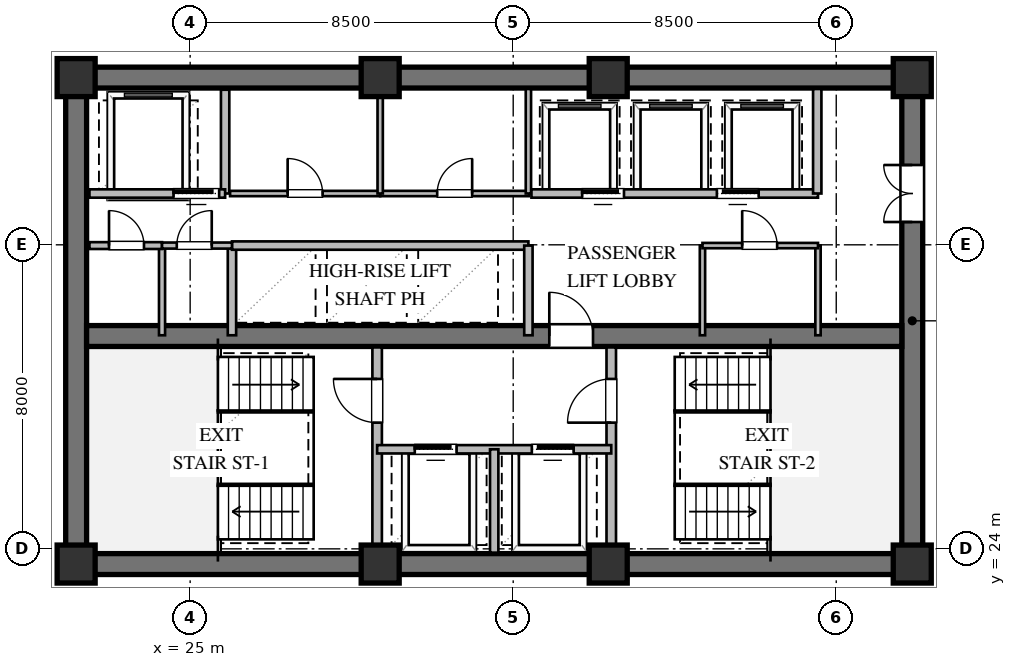
"""IFC4 building model, lengths in metres.
Left out: names, types, materials, properties, quantities, classifications, styles, units other than length and angle.
Written with IfcOpenShell. Run it as: python <this file> out.ifc"""

import sys

from ifc_helpers import new_model, si_unit, direction, frame, frame_2d, origin, origin_2d, place, context, subcontext, project, spatial, rectangle, extrude, element, fill, save


model = new_model("IFC4")
c1 = context("Model", 3, precision=1e-05, world=origin(), true_north=direction((0.0, 1.0)))
c2 = subcontext(c1, "Body", "Model", "MODEL_VIEW")
j1 = project(units=[si_unit("LENGTHUNIT", "METRE"), si_unit("PLANEANGLEUNIT", "RADIAN")], contexts=[c1])
p1 = place(None, origin())
s1 = spatial("IfcSite", under=j1, at=p1, CompositionType="ELEMENT")
p2 = place(p1, origin())
s2 = spatial("IfcBuilding", under=s1, at=p2, CompositionType="ELEMENT")
p3 = place(p2, frame((0.0, 0.0, 149.4)))
s3 = spatial("IfcBuildingStorey", under=s2, at=p3, CompositionType="ELEMENT", Elevation=149.4)
for number, where, z_axis, x_axis in (
    (1, (21.725, 23.6, 0.0), (0.0, 0.0, 1.0), (1.0, 0.0, 0.0)),
    (2, (21.725, 36.4, 0.0), (0.0, 0.0, 1.0), (1.0, 0.0, 0.0)),
):
    element("IfcWall", number, at=place(p3, frame(where, z_axis=z_axis, x_axis=x_axis)), inside=s3, PredefinedType="SHEAR", context=c2, shape_type="SweptSolid", body=[
        extrude(rectangle(XDim=22.55, YDim=0.55, at=frame_2d((11.275, 0.0))), origin(), (0.0, 0.0, 1.0), 3.36),
    ])
p4 = place(p3, frame((22.0, 23.875, 0.0), z_axis=(0.0, 0.0, 1.0), x_axis=(0.0, 1.0, 0.0)))
e3 = element("IfcWall", 3, at=p4, inside=s3, PredefinedType="SHEAR", context=c2, shape_type="SweptSolid", body=[
    extrude(rectangle(XDim=12.25, YDim=0.55, at=frame_2d((6.125, 0.0))), origin(), (0.0, 0.0, 1.0), 3.36),
])
p5 = place(p3, frame((44.0, 23.875, 0.0), z_axis=(0.0, 0.0, 1.0), x_axis=(0.0, 1.0, 0.0)))
e4 = element("IfcWall", 4, at=p5, inside=s3, PredefinedType="SHEAR", context=c2, shape_type="SweptSolid", body=[
    extrude(rectangle(XDim=12.25, YDim=0.55, at=frame_2d((6.125, 0.0))), origin(), (0.0, 0.0, 1.0), 3.36),
])
p6 = place(p5, frame((8.725, 0.0, 0.0)))
e5 = element("IfcOpeningElement", 5, at=p6, cuts=e4, PredefinedType="OPENING", context=c2, shape_type="SweptSolid", body=[
    extrude(rectangle(XDim=1.5, YDim=2.15, at=frame_2d((0.75, 1.075))), frame((0.0, 0.285, 0.0), z_axis=(0.0, -1.0, 0.0), x_axis=(1.0, 0.0, 0.0)), (0.0, 0.0, 1.0), 0.57),
])
p7 = place(p3, frame((22.275, 29.6, 0.0), z_axis=(0.0, 0.0, 1.0), x_axis=(1.0, 0.0, 0.0)))
e6 = element("IfcWall", 6, at=p7, inside=s3, PredefinedType="SHEAR", context=c2, shape_type="SweptSolid", body=[
    extrude(rectangle(XDim=21.45, YDim=0.55, at=frame_2d((10.725, 0.0))), origin(), (0.0, 0.0, 1.0), 3.36),
])
p8 = place(p7, frame((12.175, 0.0, 0.0)))
e7 = element("IfcOpeningElement", 7, at=p8, cuts=e6, PredefinedType="OPENING", context=c2, shape_type="SweptSolid", body=[
    extrude(rectangle(XDim=1.15, YDim=2.1, at=frame_2d((0.575, 1.05))), frame((0.0, 0.285, 0.0), z_axis=(0.0, -1.0, 0.0), x_axis=(1.0, 0.0, 0.0)), (0.0, 0.0, 1.0), 0.57),
])
for number, where, z_axis, x_axis in (
    (8, (22.0, 23.6, 0.0), (0.0, 0.0, 1.0), (1.0, 0.0, 0.0)),
    (9, (30.0, 23.6, 0.0), (0.0, 0.0, 1.0), (1.0, 0.0, 0.0)),
    (10, (36.0, 23.6, 0.0), (0.0, 0.0, 1.0), (1.0, 0.0, 0.0)),
    (11, (44.0, 23.6, 0.0), (0.0, 0.0, 1.0), (1.0, 0.0, 0.0)),
    (12, (44.0, 36.4, 0.0), (0.0, 0.0, 1.0), (1.0, 0.0, 0.0)),
    (13, (36.0, 36.4, 0.0), (0.0, 0.0, 1.0), (1.0, 0.0, 0.0)),
    (14, (30.0, 36.4, 0.0), (0.0, 0.0, 1.0), (1.0, 0.0, 0.0)),
    (15, (22.0, 36.4, 0.0), (0.0, 0.0, 1.0), (1.0, 0.0, 0.0)),
):
    element("IfcColumn", number, at=place(p3, frame(where, z_axis=z_axis, x_axis=x_axis)), inside=s3, PredefinedType="COLUMN", context=c2, shape_type="SweptSolid", body=[
        extrude(rectangle(XDim=1.0, YDim=1.0, at=origin_2d()), origin(), (0.0, 0.0, 1.0), 3.6),
    ])
p9 = place(p3, frame((29.92, 23.9, 0.0), z_axis=(0.0, 0.0, 1.0), x_axis=(0.0, 1.0, 0.0)))
e16 = element("IfcWall", 16, at=p9, inside=s3, PredefinedType="SOLIDWALL", context=c2, shape_type="SweptSolid", body=[
    extrude(rectangle(XDim=5.4, YDim=0.25, at=frame_2d((2.7, 0.0))), origin(), (0.0, 0.0, 1.0), 2.89),
])
p10 = place(p9, frame((3.421, 0.0, 0.0)))
e17 = element("IfcOpeningElement", 17, at=p10, cuts=e16, PredefinedType="OPENING", context=c2, shape_type="SweptSolid", body=[
    extrude(rectangle(XDim=1.15, YDim=2.1, at=frame_2d((0.575, 1.05))), frame((0.0, 0.135, 0.0), z_axis=(0.0, -1.0, 0.0), x_axis=(1.0, 0.0, 0.0)), (0.0, 0.0, 1.0), 0.27),
])
p11 = place(p3, frame((36.08, 23.9, 0.0), z_axis=(0.0, 0.0, 1.0), x_axis=(0.0, 1.0, 0.0)))
e18 = element("IfcWall", 18, at=p11, inside=s3, PredefinedType="SOLIDWALL", context=c2, shape_type="SweptSolid", body=[
    extrude(rectangle(XDim=5.4, YDim=0.25, at=frame_2d((2.7, 0.0))), origin(), (0.0, 0.0, 1.0), 3.36),
])
p12 = place(p11, frame((3.421, 0.0, 0.0)))
e19 = element("IfcOpeningElement", 19, at=p12, cuts=e18, PredefinedType="OPENING", context=c2, shape_type="SweptSolid", body=[
    extrude(rectangle(XDim=1.15, YDim=2.1, at=frame_2d((0.575, 1.05))), frame((0.0, 0.135, 0.0), z_axis=(0.0, -1.0, 0.0), x_axis=(1.0, 0.0, 0.0)), (0.0, 0.0, 1.0), 0.27),
])
p13 = place(p3, frame((29.92, 26.62, 0.0), z_axis=(0.0, 0.0, 1.0), x_axis=(1.0, 0.0, 0.0)))
e20 = element("IfcWall", 20, at=p13, inside=s3, PredefinedType="SOLIDWALL", context=c2, shape_type="SweptSolid", body=[
    extrude(rectangle(XDim=6.16, YDim=0.22, at=frame_2d((3.08, 0.0))), origin(), (0.0, 0.0, 1.0), 3.36),
])
p14 = place(p13, frame((0.99, 0.0, 0.0)))
e21 = element("IfcOpeningElement", 21, at=p14, cuts=e20, PredefinedType="OPENING", context=c2, shape_type="SweptSolid", body=[
    extrude(rectangle(XDim=1.1, YDim=2.1, at=frame_2d((0.55, 1.05))), frame((0.0, 0.12, 0.0), z_axis=(0.0, -1.0, 0.0), x_axis=(1.0, 0.0, 0.0)), (0.0, 0.0, 1.0), 0.24),
])
p15 = place(p13, frame((4.07, 0.0, 0.0)))
e22 = element("IfcOpeningElement", 22, at=p15, cuts=e20, PredefinedType="OPENING", context=c2, shape_type="SweptSolid", body=[
    extrude(rectangle(XDim=1.1, YDim=2.1, at=frame_2d((0.55, 1.05))), frame((0.0, 0.12, 0.0), z_axis=(0.0, -1.0, 0.0), x_axis=(1.0, 0.0, 0.0)), (0.0, 0.0, 1.0), 0.24),
])
p16 = place(p3, frame((33.0, 23.9, 0.0), z_axis=(0.0, 0.0, 1.0), x_axis=(0.0, 1.0, 0.0)))
e23 = element("IfcWall", 23, at=p16, inside=s3, PredefinedType="SOLIDWALL", context=c2, shape_type="SweptSolid", body=[
    extrude(rectangle(XDim=2.72, YDim=0.22, at=frame_2d((1.36, 0.0))), origin(), (0.0, 0.0, 1.0), 3.36),
])
p17 = place(p3, frame((25.92, 33.35, 0.0), z_axis=(0.0, 0.0, 1.0), x_axis=(0.0, 1.0, 0.0)))
e24 = element("IfcWall", 24, at=p17, inside=s3, PredefinedType="SOLIDWALL", context=c2, shape_type="SweptSolid", body=[
    extrude(rectangle(XDim=2.73, YDim=0.22, at=frame_2d((1.365, 0.0))), origin(), (0.0, 0.0, 1.0), 3.36),
])
p18 = place(p3, frame((22.35, 33.35, 0.0), z_axis=(0.0, 0.0, 1.0), x_axis=(1.0, 0.0, 0.0)))
e25 = element("IfcWall", 25, at=p18, inside=s3, PredefinedType="SOLIDWALL", context=c2, shape_type="SweptSolid", body=[
    extrude(rectangle(XDim=3.57, YDim=0.22, at=frame_2d((1.785, 0.0))), origin(), (0.0, 0.0, 1.0), 3.36),
])
p19 = place(p18, frame((2.213, 0.0, 0.0)))
e26 = element("IfcOpeningElement", 26, at=p19, cuts=e25, PredefinedType="OPENING", context=c2, shape_type="SweptSolid", body=[
    extrude(rectangle(XDim=1.2, YDim=2.1, at=frame_2d((0.6, 1.05))), frame((0.0, 0.12, 0.0), z_axis=(0.0, -1.0, 0.0), x_axis=(1.0, 0.0, 0.0)), (0.0, 0.0, 1.0), 0.24),
])
p20 = place(p3, frame((26.1, 29.62, 0.0), z_axis=(0.0, 0.0, 1.0), x_axis=(0.0, 1.0, 0.0)))
e27 = element("IfcWall", 27, at=p20, inside=s3, PredefinedType="SOLIDWALL", context=c2, shape_type="SweptSolid", body=[
    extrude(rectangle(XDim=2.36, YDim=0.22, at=frame_2d((1.18, 0.0))), origin(), (0.0, 0.0, 1.0), 3.36),
])
p21 = place(p3, frame((26.1, 31.98, 0.0), z_axis=(0.0, 0.0, 1.0), x_axis=(1.0, 0.0, 0.0)))
e28 = element("IfcWall", 28, at=p21, inside=s3, PredefinedType="SOLIDWALL", context=c2, shape_type="SweptSolid", body=[
    extrude(rectangle(XDim=7.8, YDim=0.22, at=frame_2d((3.9, 0.0))), origin(), (0.0, 0.0, 1.0), 3.36),
])
p22 = place(p3, frame((33.9, 29.62, 0.0), z_axis=(0.0, 0.0, 1.0), x_axis=(0.0, 1.0, 0.0)))
e29 = element("IfcWall", 29, at=p22, inside=s3, PredefinedType="SOLIDWALL", context=c2, shape_type="SweptSolid", body=[
    extrude(rectangle(XDim=2.36, YDim=0.22, at=frame_2d((1.18, 0.0))), origin(), (0.0, 0.0, 1.0), 3.36),
])
p23 = place(p3, frame((26.05, 33.35, 0.0), z_axis=(0.0, 0.0, 1.0), x_axis=(1.0, 0.0, 0.0)))
e30 = element("IfcWall", 30, at=p23, inside=s3, PredefinedType="PARTITIONING", context=c2, shape_type="SweptSolid", body=[
    extrude(rectangle(XDim=3.95, YDim=0.14, at=frame_2d((1.975, 0.0))), origin(), (0.0, 0.0, 1.0), 3.36),
])
p24 = place(p23, frame((1.515, 0.0, 0.0)))
e31 = element("IfcOpeningElement", 31, at=p24, cuts=e30, PredefinedType="OPENING", context=c2, shape_type="SweptSolid", body=[
    extrude(rectangle(XDim=0.92, YDim=2.1, at=frame_2d((0.46, 1.05))), frame((0.0, 0.08, 0.0), z_axis=(0.0, -1.0, 0.0), x_axis=(1.0, 0.0, 0.0)), (0.0, 0.0, 1.0), 0.16),
])
p25 = place(p3, frame((30.0, 33.35, 0.0), z_axis=(0.0, 0.0, 1.0), x_axis=(1.0, 0.0, 0.0)))
e32 = element("IfcWall", 32, at=p25, inside=s3, PredefinedType="PARTITIONING", context=c2, shape_type="SweptSolid", body=[
    extrude(rectangle(XDim=3.92, YDim=0.14, at=frame_2d((1.96, 0.0))), origin(), (0.0, 0.0, 1.0), 3.36),
])
p26 = place(p25, frame((1.5, 0.0, 0.0)))
e33 = element("IfcOpeningElement", 33, at=p26, cuts=e32, PredefinedType="OPENING", context=c2, shape_type="SweptSolid", body=[
    extrude(rectangle(XDim=0.92, YDim=2.1, at=frame_2d((0.46, 1.05))), frame((0.0, 0.08, 0.0), z_axis=(0.0, -1.0, 0.0), x_axis=(1.0, 0.0, 0.0)), (0.0, 0.0, 1.0), 0.16),
])
for number, where, z_axis, x_axis in (
    (34, (30.0, 33.35, 0.0), (0.0, 0.0, 1.0), (0.0, 1.0, 0.0)),
    (35, (33.9, 33.35, 0.0), (0.0, 0.0, 1.0), (0.0, 1.0, 0.0)),
):
    element("IfcWall", number, at=place(p3, frame(where, z_axis=z_axis, x_axis=x_axis)), inside=s3, PredefinedType="PARTITIONING", context=c2, shape_type="SweptSolid", body=[
        extrude(rectangle(XDim=2.75, YDim=0.14, at=frame_2d((1.375, 0.0))), origin(), (0.0, 0.0, 1.0), 3.36),
    ])
p27 = place(p3, frame((33.98, 33.35, 0.0), z_axis=(0.0, 0.0, 1.0), x_axis=(1.0, 0.0, 0.0)))
e36 = element("IfcWall", 36, at=p27, inside=s3, PredefinedType="SOLIDWALL", context=c2, shape_type="SweptSolid", body=[
    extrude(rectangle(XDim=7.54, YDim=0.22, at=frame_2d((3.77, 0.0))), origin(), (0.0, 0.0, 1.0), 3.36),
])
p28 = place(p27, frame((1.335, 0.0, 0.0)))
e37 = element("IfcOpeningElement", 37, at=p28, cuts=e36, PredefinedType="OPENING", context=c2, shape_type="SweptSolid", body=[
    extrude(rectangle(XDim=1.1, YDim=2.1, at=frame_2d((0.55, 1.05))), frame((0.0, 0.12, 0.0), z_axis=(0.0, -1.0, 0.0), x_axis=(1.0, 0.0, 0.0)), (0.0, 0.0, 1.0), 0.24),
])
p29 = place(p27, frame((4.879, 0.0, 0.0)))
e38 = element("IfcOpeningElement", 38, at=p29, cuts=e36, PredefinedType="OPENING", context=c2, shape_type="SweptSolid", body=[
    extrude(rectangle(XDim=1.1, YDim=2.1, at=frame_2d((0.55, 1.05))), frame((0.0, 0.12, 0.0), z_axis=(0.0, -1.0, 0.0), x_axis=(1.0, 0.0, 0.0)), (0.0, 0.0, 1.0), 0.24),
])
p30 = place(p3, frame((41.5, 33.35, 0.0), z_axis=(0.0, 0.0, 1.0), x_axis=(0.0, 1.0, 0.0)))
e39 = element("IfcWall", 39, at=p30, inside=s3, PredefinedType="SOLIDWALL", context=c2, shape_type="SweptSolid", body=[
    extrude(rectangle(XDim=2.75, YDim=0.22, at=frame_2d((1.375, 0.0))), origin(), (0.0, 0.0, 1.0), 3.36),
])
p31 = place(p3, frame((24.26, 29.62, 0.0), z_axis=(0.0, 0.0, 1.0), x_axis=(0.0, 1.0, 0.0)))
e40 = element("IfcWall", 40, at=p31, inside=s3, PredefinedType="PLUMBINGWALL", context=c2, shape_type="SweptSolid", body=[
    extrude(rectangle(XDim=2.36, YDim=0.16, at=frame_2d((1.18, 0.0))), origin(), (0.0, 0.0, 1.0), 3.36),
])
p32 = place(p3, frame((22.35, 31.98, 0.0), z_axis=(0.0, 0.0, 1.0), x_axis=(1.0, 0.0, 0.0)))
e41 = element("IfcWall", 41, at=p32, inside=s3, PredefinedType="PARTITIONING", context=c2, shape_type="SweptSolid", body=[
    extrude(rectangle(XDim=1.91, YDim=0.18, at=frame_2d((0.955, 0.0))), origin(), (0.0, 0.0, 1.0), 3.36),
])
p33 = place(p32, frame((0.515, 0.0, 0.0)))
e42 = element("IfcOpeningElement", 42, at=p33, cuts=e41, PredefinedType="OPENING", context=c2, shape_type="SweptSolid", body=[
    extrude(rectangle(XDim=0.92, YDim=2.1, at=frame_2d((0.46, 1.05))), frame((0.0, 0.1, 0.0), z_axis=(0.0, -1.0, 0.0), x_axis=(1.0, 0.0, 0.0)), (0.0, 0.0, 1.0), 0.2),
])
p34 = place(p3, frame((24.26, 31.98, 0.0), z_axis=(0.0, 0.0, 1.0), x_axis=(1.0, 0.0, 0.0)))
e43 = element("IfcWall", 43, at=p34, inside=s3, PredefinedType="PLUMBINGWALL", context=c2, shape_type="SweptSolid", body=[
    extrude(rectangle(XDim=1.84, YDim=0.16, at=frame_2d((0.92, 0.0))), origin(), (0.0, 0.0, 1.0), 3.36),
])
p35 = place(p34, frame((0.388, 0.0, 0.0)))
e44 = element("IfcOpeningElement", 44, at=p35, cuts=e43, PredefinedType="OPENING", context=c2, shape_type="SweptSolid", body=[
    extrude(rectangle(XDim=0.92, YDim=2.1, at=frame_2d((0.46, 1.05))), frame((0.0, 0.09, 0.0), z_axis=(0.0, -1.0, 0.0), x_axis=(1.0, 0.0, 0.0)), (0.0, 0.0, 1.0), 0.18),
])
for number, where, z_axis, x_axis in (
    (45, (38.48, 29.62, 0.0), (0.0, 0.0, 1.0), (0.0, 1.0, 0.0)),
    (46, (41.52, 29.62, 0.0), (0.0, 0.0, 1.0), (0.0, 1.0, 0.0)),
):
    element("IfcWall", number, at=place(p3, frame(where, z_axis=z_axis, x_axis=x_axis)), inside=s3, PredefinedType="PARTITIONING", context=c2, shape_type="SweptSolid", body=[
        extrude(rectangle(XDim=2.36, YDim=0.14, at=frame_2d((1.18, 0.0))), origin(), (0.0, 0.0, 1.0), 3.36),
    ])
p36 = place(p3, frame((38.48, 31.98, 0.0), z_axis=(0.0, 0.0, 1.0), x_axis=(1.0, 0.0, 0.0)))
e47 = element("IfcWall", 47, at=p36, inside=s3, PredefinedType="PARTITIONING", context=c2, shape_type="SweptSolid", body=[
    extrude(rectangle(XDim=3.04, YDim=0.14, at=frame_2d((1.52, 0.0))), origin(), (0.0, 0.0, 1.0), 3.36),
])
p37 = place(p36, frame((1.045, 0.0, 0.0)))
e48 = element("IfcOpeningElement", 48, at=p37, cuts=e47, PredefinedType="OPENING", context=c2, shape_type="SweptSolid", body=[
    extrude(rectangle(XDim=0.92, YDim=2.1, at=frame_2d((0.46, 1.05))), frame((0.0, 0.08, 0.0), z_axis=(0.0, -1.0, 0.0), x_axis=(1.0, 0.0, 0.0)), (0.0, 0.0, 1.0), 0.16),
])
p38 = place(p10, origin())
e49 = element("IfcDoor", 49, at=p38, inside=s3, OperationType="SINGLE_SWING_RIGHT", PredefinedType="DOOR", context=c2, shape_type="SweptSolid", body=[
    extrude(rectangle(XDim=1.15, YDim=2.1, at=frame_2d((0.575, 1.05))), frame((0.0, 0.025, 0.0), z_axis=(0.0, -1.0, 0.0), x_axis=(1.0, 0.0, 0.0)), (0.0, 0.0, 1.0), 0.05),
])
fill(e17, e49)
p39 = place(p12, origin())
e50 = element("IfcDoor", 50, at=p39, inside=s3, OperationType="SINGLE_SWING_LEFT", PredefinedType="DOOR", context=c2, shape_type="SweptSolid", body=[
    extrude(rectangle(XDim=1.15, YDim=2.1, at=frame_2d((0.575, 1.05))), frame((0.0, 0.025, 0.0), z_axis=(0.0, -1.0, 0.0), x_axis=(1.0, 0.0, 0.0)), (0.0, 0.0, 1.0), 0.05),
])
fill(e19, e50)
p40 = place(p14, origin())
e51 = element("IfcDoor", 51, at=p40, inside=s3, OperationType="SLIDING_TO_LEFT", PredefinedType="DOOR", context=c2, shape_type="SweptSolid", body=[
    extrude(rectangle(XDim=1.1, YDim=2.1, at=frame_2d((0.55, 1.05))), frame((0.0, 0.025, 0.0), z_axis=(0.0, -1.0, 0.0), x_axis=(1.0, 0.0, 0.0)), (0.0, 0.0, 1.0), 0.05),
])
fill(e21, e51)
p41 = place(p15, origin())
e52 = element("IfcDoor", 52, at=p41, inside=s3, OperationType="SLIDING_TO_RIGHT", PredefinedType="DOOR", context=c2, shape_type="SweptSolid", body=[
    extrude(rectangle(XDim=1.1, YDim=2.1, at=frame_2d((0.55, 1.05))), frame((0.0, 0.025, 0.0), z_axis=(0.0, -1.0, 0.0), x_axis=(1.0, 0.0, 0.0)), (0.0, 0.0, 1.0), 0.05),
])
fill(e22, e52)
p42 = place(p8, origin())
e53 = element("IfcDoor", 53, at=p42, inside=s3, OperationType="SINGLE_SWING_LEFT", PredefinedType="DOOR", context=c2, shape_type="SweptSolid", body=[
    extrude(rectangle(XDim=1.15, YDim=2.1, at=frame_2d((0.575, 1.05))), frame((0.0, 0.025, 0.0), z_axis=(0.0, -1.0, 0.0), x_axis=(1.0, 0.0, 0.0)), (0.0, 0.0, 1.0), 0.05),
])
fill(e7, e53)
p43 = place(p6, origin())
e54 = element("IfcDoor", 54, at=p43, inside=s3, OperationType="DOUBLE_DOOR_SINGLE_SWING", PredefinedType="DOOR", context=c2, shape_type="SweptSolid", body=[
    extrude(rectangle(XDim=1.5, YDim=2.15, at=frame_2d((0.75, 1.075))), frame((0.0, 0.025, 0.0), z_axis=(0.0, -1.0, 0.0), x_axis=(1.0, 0.0, 0.0)), (0.0, 0.0, 1.0), 0.05),
])
fill(e5, e54)
p44 = place(p19, origin())
e55 = element("IfcDoor", 55, at=p44, inside=s3, OperationType="SLIDING_TO_LEFT", PredefinedType="DOOR", context=c2, shape_type="SweptSolid", body=[
    extrude(rectangle(XDim=1.2, YDim=2.1, at=frame_2d((0.6, 1.05))), frame((0.0, 0.025, 0.0), z_axis=(0.0, -1.0, 0.0), x_axis=(1.0, 0.0, 0.0)), (0.0, 0.0, 1.0), 0.05),
])
fill(e26, e55)
p45 = place(p24, origin())
e56 = element("IfcDoor", 56, at=p45, inside=s3, OperationType="SINGLE_SWING_LEFT", PredefinedType="DOOR", context=c2, shape_type="SweptSolid", body=[
    extrude(rectangle(XDim=0.92, YDim=2.1, at=frame_2d((0.46, 1.05))), frame((0.0, 0.025, 0.0), z_axis=(0.0, -1.0, 0.0), x_axis=(1.0, 0.0, 0.0)), (0.0, 0.0, 1.0), 0.05),
])
fill(e31, e56)
p46 = place(p26, origin())
e57 = element("IfcDoor", 57, at=p46, inside=s3, OperationType="SINGLE_SWING_RIGHT", PredefinedType="DOOR", context=c2, shape_type="SweptSolid", body=[
    extrude(rectangle(XDim=0.92, YDim=2.1, at=frame_2d((0.46, 1.05))), frame((0.0, 0.025, 0.0), z_axis=(0.0, -1.0, 0.0), x_axis=(1.0, 0.0, 0.0)), (0.0, 0.0, 1.0), 0.05),
])
fill(e33, e57)
p47 = place(p28, origin())
e58 = element("IfcDoor", 58, at=p47, inside=s3, OperationType="SLIDING_TO_LEFT", PredefinedType="DOOR", context=c2, shape_type="SweptSolid", body=[
    extrude(rectangle(XDim=1.1, YDim=2.1, at=frame_2d((0.55, 1.05))), frame((0.0, 0.025, 0.0), z_axis=(0.0, -1.0, 0.0), x_axis=(1.0, 0.0, 0.0)), (0.0, 0.0, 1.0), 0.05),
])
fill(e37, e58)
p48 = place(p29, origin())
e59 = element("IfcDoor", 59, at=p48, inside=s3, OperationType="SLIDING_TO_RIGHT", PredefinedType="DOOR", context=c2, shape_type="SweptSolid", body=[
    extrude(rectangle(XDim=1.1, YDim=2.1, at=frame_2d((0.55, 1.05))), frame((0.0, 0.025, 0.0), z_axis=(0.0, -1.0, 0.0), x_axis=(1.0, 0.0, 0.0)), (0.0, 0.0, 1.0), 0.05),
])
fill(e38, e59)
p49 = place(p33, origin())
e60 = element("IfcDoor", 60, at=p49, inside=s3, OperationType="SINGLE_SWING_LEFT", PredefinedType="DOOR", context=c2, shape_type="SweptSolid", body=[
    extrude(rectangle(XDim=0.92, YDim=2.1, at=frame_2d((0.46, 1.05))), frame((0.0, 0.025, 0.0), z_axis=(0.0, -1.0, 0.0), x_axis=(1.0, 0.0, 0.0)), (0.0, 0.0, 1.0), 0.05),
])
fill(e42, e60)
p50 = place(p35, origin())
e61 = element("IfcDoor", 61, at=p50, inside=s3, OperationType="SINGLE_SWING_RIGHT", PredefinedType="DOOR", context=c2, shape_type="SweptSolid", body=[
    extrude(rectangle(XDim=0.92, YDim=2.1, at=frame_2d((0.46, 1.05))), frame((0.0, 0.025, 0.0), z_axis=(0.0, -1.0, 0.0), x_axis=(1.0, 0.0, 0.0)), (0.0, 0.0, 1.0), 0.05),
])
fill(e44, e61)
p51 = place(p37, origin())
e62 = element("IfcDoor", 62, at=p51, inside=s3, OperationType="SINGLE_SWING_LEFT", PredefinedType="DOOR", context=c2, shape_type="SweptSolid", body=[
    extrude(rectangle(XDim=0.92, YDim=2.1, at=frame_2d((0.46, 1.05))), frame((0.0, 0.025, 0.0), z_axis=(0.0, -1.0, 0.0), x_axis=(1.0, 0.0, 0.0)), (0.0, 0.0, 1.0), 0.05),
])
fill(e48, e62)
save(model, sys.argv[1])
